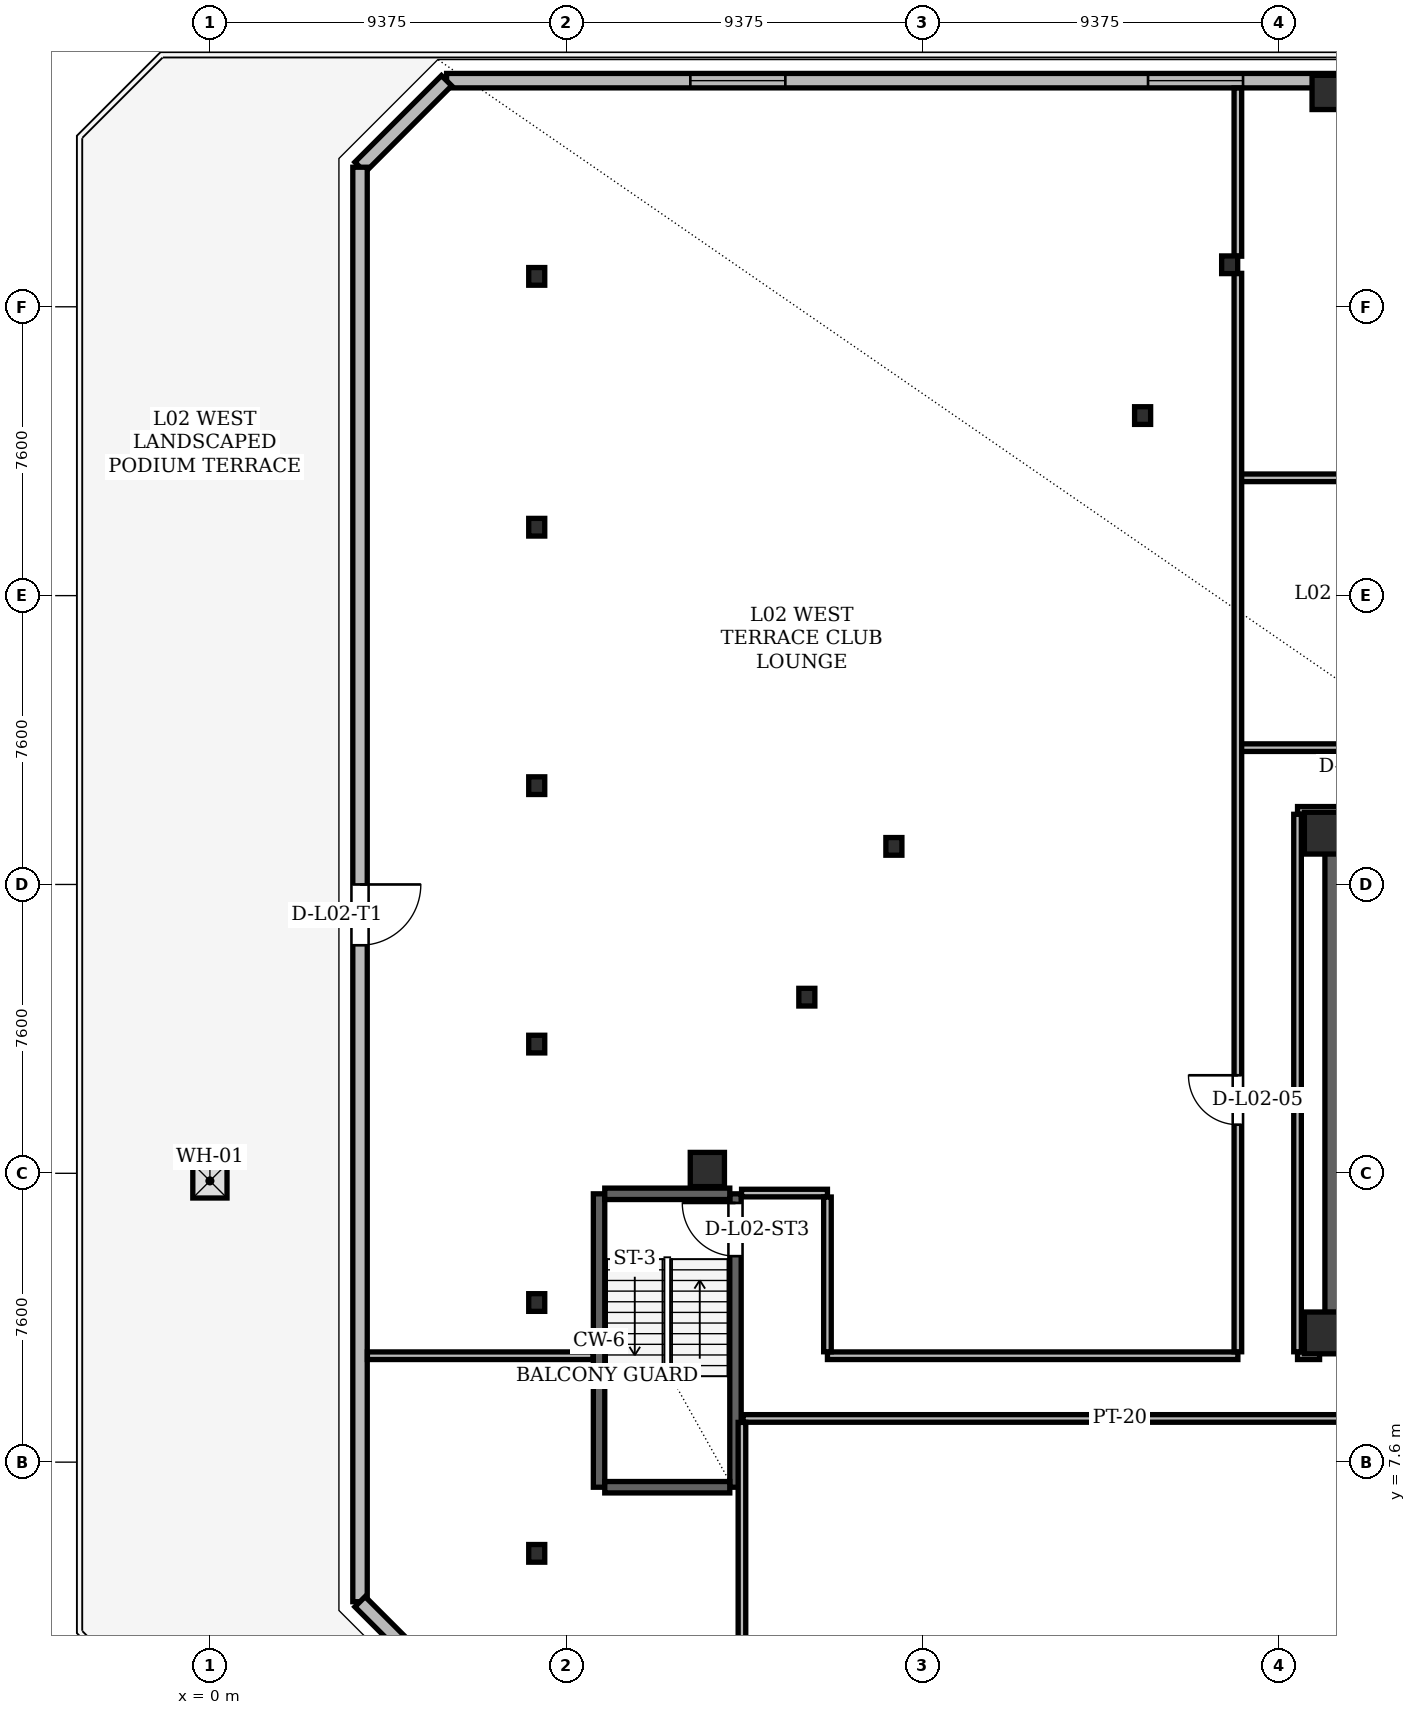
"""IFC4 building model, lengths in metres.
Left out: names, types, materials, properties, quantities, classifications, styles, units other than length and angle.
Written with IfcOpenShell. Run it as: python <this file> out.ifc"""

import sys

from ifc_helpers import new_model, si_unit, direction, frame, frame_2d, origin, origin_2d, place, context, subcontext, project, spatial, rectangle, hollow_rectangle, i_section, extrude, element, fill, save


model = new_model("IFC4")
c1 = context("Model", 3, precision=1e-05, world=origin(), true_north=direction((0.0, 1.0)))
c2 = subcontext(c1, "Body", "Model", "MODEL_VIEW")
j1 = project(units=[si_unit("LENGTHUNIT", "METRE"), si_unit("PLANEANGLEUNIT", "RADIAN")], contexts=[c1])
p1 = place(None, origin())
s1 = spatial("IfcSite", under=j1, at=p1, CompositionType="ELEMENT")
p2 = place(p1, origin())
s2 = spatial("IfcBuilding", under=s1, at=p2, CompositionType="ELEMENT")
p3 = place(p2, frame((0.0, 0.0, 9.9)))
s3 = spatial("IfcBuildingStorey", under=s2, at=p3, CompositionType="ELEMENT", Elevation=9.9)
for number, where, z_axis, x_axis in (
    (1, (29.35, 11.0, 0.0), (0.0, 0.0, 1.0), (1.0, 0.0, 0.0)),
    (2, (29.35, 24.15, 0.0), (0.0, 0.0, 1.0), (1.0, 0.0, 0.0)),
):
    element("IfcColumn", number, at=place(p3, frame(where, z_axis=z_axis, x_axis=x_axis)), inside=s3, PredefinedType="COLUMN", context=c2, shape_type="SweptSolid", body=[
        extrude(hollow_rectangle(XDim=1.1, YDim=1.1, WallThickness=0.09, at=origin_2d()), origin(), (0.0, 0.0, 1.0), 4.2),
    ])
for number, where, z_axis, x_axis in (
    (3, (13.09, 15.3, 0.005), (0.0, 0.0, 1.0), (1.0, 0.0, 0.0)),
    (4, (29.452, 43.64, 0.005), (0.0, 0.0, 1.0), (1.0, 0.0, 0.0)),
):
    element("IfcColumn", number, at=place(p3, frame(where, z_axis=z_axis, x_axis=x_axis)), inside=s3, PredefinedType="COLUMN", context=c2, shape_type="SweptSolid", body=[
        extrude(hollow_rectangle(XDim=0.9, YDim=0.9, WallThickness=0.075, at=origin_2d()), origin(), (0.0, 0.0, 1.0), 4.191),
    ])
for number, where, z_axis, x_axis in (
    (5, (26.834, 39.106, 0.005), (0.0, 0.0, 1.0), (1.0, 0.0, 0.0)),
    (6, (24.543, 35.138, 0.005), (0.0, 0.0, 1.0), (1.0, 0.0, 0.0)),
    (7, (17.998, 23.802, 0.005), (0.0, 0.0, 1.0), (1.0, 0.0, 0.0)),
    (8, (15.708, 19.834, 0.005), (0.0, 0.0, 1.0), (1.0, 0.0, 0.0)),
):
    element("IfcColumn", number, at=place(p3, frame(where, z_axis=z_axis, x_axis=x_axis)), inside=s3, PredefinedType="COLUMN", context=c2, shape_type="SweptSolid", body=[
        extrude(i_section(OverallWidth=0.422, OverallDepth=0.465, WebThickness=0.045, FlangeThickness=0.072, at=origin_2d()), origin(), (0.0, 0.0, 1.0), 4.191),
    ])
for number, where, z_axis, x_axis in (
    (9, (8.6, 5.2, 0.0), (0.0, 0.0, 1.0), (1.0, 0.0, 0.0)),
    (10, (8.6, 11.8, 0.0), (0.0, 0.0, 1.0), (1.0, 0.0, 0.0)),
    (11, (8.6, 18.6, 0.0), (0.0, 0.0, 1.0), (1.0, 0.0, 0.0)),
    (12, (8.6, 25.4, 0.0), (0.0, 0.0, 1.0), (1.0, 0.0, 0.0)),
    (13, (8.6, 32.2, 0.0), (0.0, 0.0, 1.0), (1.0, 0.0, 0.0)),
    (14, (8.6, 38.8, 0.0), (0.0, 0.0, 1.0), (1.0, 0.0, 0.0)),
):
    element("IfcColumn", number, at=place(p3, frame(where, z_axis=z_axis, x_axis=x_axis)), inside=s3, PredefinedType="COLUMN", context=c2, shape_type="SweptSolid", body=[
        extrude(i_section(OverallWidth=0.422, OverallDepth=0.465, WebThickness=0.045, FlangeThickness=0.072, at=origin_2d()), origin(), (0.0, 0.0, 1.0), 4.2),
    ])
p4 = place(p3, frame((29.64, 11.0, 0.0), z_axis=(0.0, 0.0, 1.0), x_axis=(0.0, 1.0, 0.0)))
e15 = element("IfcWall", 15, at=p4, inside=s3, PredefinedType="SHEAR", context=c2, shape_type="SweptSolid", body=[
    extrude(rectangle(XDim=13.3, YDim=0.6, at=frame_2d((6.65, 0.0))), origin(), (0.0, 0.0, 1.0), 3.92),
])
p5 = place(p3, frame((29.35, 11.24, 0.0), z_axis=(0.0, 0.0, 1.0), x_axis=(1.0, 0.0, 0.0)))
e16 = element("IfcWall", 16, at=p5, inside=s3, PredefinedType="SHEAR", context=c2, shape_type="SweptSolid", body=[
    extrude(rectangle(XDim=7.1, YDim=0.6, at=frame_2d((3.55, 0.0))), origin(), (0.0, 0.0, 1.0), 3.92),
])
p6 = place(p3, frame((10.24, 6.94, 0.0), z_axis=(0.0, 0.0, 1.0), x_axis=(0.0, 1.0, 0.0)))
e17 = element("IfcWall", 17, at=p6, inside=s3, PredefinedType="SHEAR", context=c2, shape_type="SweptSolid", body=[
    extrude(rectangle(XDim=7.72, YDim=0.3, at=frame_2d((3.86, 0.0))), origin(), (0.0, 0.0, 1.0), 3.92),
])
p7 = place(p3, frame((13.83, 6.94, 0.0), z_axis=(0.0, 0.0, 1.0), x_axis=(0.0, 1.0, 0.0)))
e18 = element("IfcWall", 18, at=p7, inside=s3, PredefinedType="SHEAR", context=c2, shape_type="SweptSolid", body=[
    extrude(rectangle(XDim=7.72, YDim=0.3, at=frame_2d((3.86, 0.0))), origin(), (0.0, 0.0, 1.0), 3.92),
])
p8 = place(p7, frame((6.08, 0.0, 0.0)))
e19 = element("IfcOpeningElement", 19, at=p8, cuts=e18, PredefinedType="OPENING", context=c2, shape_type="SweptSolid", body=[
    extrude(rectangle(XDim=1.4, YDim=2.2, at=frame_2d((0.7, 1.1))), frame((0.0, 0.15, 0.0), z_axis=(0.0, -1.0, 0.0), x_axis=(1.0, 0.0, 0.0)), (0.0, 0.0, 1.0), 0.3),
])
for number, where, z_axis, x_axis in (
    (20, (10.39, 6.94, 0.0), (0.0, 0.0, 1.0), (1.0, 0.0, 0.0)),
    (21, (10.39, 14.66, 0.0), (0.0, 0.0, 1.0), (1.0, 0.0, 0.0)),
):
    element("IfcWall", number, at=place(p3, frame(where, z_axis=z_axis, x_axis=x_axis)), inside=s3, PredefinedType="SHEAR", context=c2, shape_type="SweptSolid", body=[
        extrude(rectangle(XDim=3.29, YDim=0.3, at=frame_2d((1.645, 0.0))), origin(), (0.0, 0.0, 1.0), 3.92),
    ])
p9 = place(p3, frame((33.6, 43.95, 0.0), z_axis=(0.0, 0.0, 1.0), x_axis=(-1.0, 0.0, 0.0)))
e22 = element("IfcWall", 22, at=p9, inside=s3, PredefinedType="SOLIDWALL", context=c2, shape_type="SweptSolid", body=[
    extrude(rectangle(XDim=27.372, YDim=0.38, at=frame_2d((13.686, 0.0))), origin(), (0.0, 0.0, 1.0), 3.054),
])
p10 = place(p9, frame((6.414, 0.0, 0.85)))
e23 = element("IfcOpeningElement", 23, at=p10, cuts=e22, PredefinedType="OPENING", context=c2, shape_type="SweptSolid", body=[
    extrude(rectangle(XDim=2.5, YDim=2.034, at=frame_2d((1.25, 1.017))), frame((0.0, 0.19, 0.0), z_axis=(0.0, -1.0, 0.0), x_axis=(1.0, 0.0, 0.0)), (0.0, 0.0, 1.0), 0.38),
])
p11 = place(p9, frame((18.458, 0.0, 0.85)))
e24 = element("IfcOpeningElement", 24, at=p11, cuts=e22, PredefinedType="OPENING", context=c2, shape_type="SweptSolid", body=[
    extrude(rectangle(XDim=2.5, YDim=2.034, at=frame_2d((1.25, 1.017))), frame((0.0, 0.19, 0.0), z_axis=(0.0, -1.0, 0.0), x_axis=(1.0, 0.0, 0.0)), (0.0, 0.0, 1.0), 0.38),
])
p12 = place(p3, frame((6.228, 43.95, 0.0), z_axis=(0.0, 0.0, 1.0), x_axis=(-0.707106781187, -0.707106781187, 0.0)))
e25 = element("IfcWall", 25, at=p12, inside=s3, PredefinedType="SOLIDWALL", context=c2, shape_type="SweptSolid", body=[
    extrude(rectangle(XDim=3.221, YDim=0.38, at=frame_2d((1.611, 0.0))), origin(), (0.0, 0.0, 1.0), 3.92),
])
p13 = place(p3, frame((3.95, 41.672, 0.0), z_axis=(0.0, 0.0, 1.0), x_axis=(0.0, -1.0, 0.0)))
e26 = element("IfcWall", 26, at=p13, inside=s3, PredefinedType="SOLIDWALL", context=c2, shape_type="SweptSolid", body=[
    extrude(rectangle(XDim=37.744, YDim=0.38, at=frame_2d((18.872, 0.0))), origin(), (0.0, 0.0, 1.0), 3.92),
])
p14 = place(p13, frame((18.872, 0.0, 0.0)))
e27 = element("IfcOpeningElement", 27, at=p14, cuts=e26, PredefinedType="OPENING", context=c2, shape_type="SweptSolid", body=[
    extrude(rectangle(XDim=1.6, YDim=2.2, at=frame_2d((0.8, 1.1))), frame((0.0, 0.19, 0.0), z_axis=(0.0, -1.0, 0.0), x_axis=(1.0, 0.0, 0.0)), (0.0, 0.0, 1.0), 0.38),
])
p15 = place(p3, frame((3.95, 3.928, 0.0), z_axis=(0.0, 0.0, 1.0), x_axis=(0.707106781187, -0.707106781187, 0.0)))
e28 = element("IfcWall", 28, at=p15, inside=s3, PredefinedType="SOLIDWALL", context=c2, shape_type="SweptSolid", body=[
    extrude(rectangle(XDim=3.221, YDim=0.38, at=frame_2d((1.611, 0.0))), origin(), (0.0, 0.0, 1.0), 3.92),
])
p16 = place(p3, frame((14.03, 8.75, 0.0), z_axis=(0.0, 0.0, 1.0), x_axis=(1.0, 0.0, 0.0)))
e29 = element("IfcWall", 29, at=p16, inside=s3, PredefinedType="PARTITIONING", context=c2, shape_type="SweptSolid", body=[
    extrude(rectangle(XDim=41.57, YDim=0.2, at=frame_2d((20.785, 0.0))), origin(), (0.0, 0.0, 1.0), 2.983),
])
p17 = place(p16, frame((20.035, 0.0, 0.0)))
e30 = element("IfcOpeningElement", 30, at=p17, cuts=e29, PredefinedType="OPENING", context=c2, shape_type="SweptSolid", body=[
    extrude(rectangle(XDim=1.3, YDim=2.2, at=frame_2d((0.65, 1.1))), frame((0.0, 0.1, 0.0), z_axis=(0.0, -1.0, 0.0), x_axis=(1.0, 0.0, 0.0)), (0.0, 0.0, 1.0), 0.2),
])
p18 = place(p3, frame((4.144, 10.4, 0.0), z_axis=(0.0, 0.0, 1.0), x_axis=(1.0, 0.0, 0.0)))
e31 = element("IfcWall", 31, at=p18, inside=s3, PredefinedType="PARTITIONING", context=c2, shape_type="SweptSolid", body=[
    extrude(rectangle(XDim=5.936, YDim=0.2, at=frame_2d((2.968, 0.0))), origin(), (0.0, 0.0, 1.0), 2.53),
])
p19 = place(p3, frame((16.25, 10.4, 0.0), z_axis=(0.0, 0.0, 1.0), x_axis=(1.0, 0.0, 0.0)))
e32 = element("IfcWall", 32, at=p19, inside=s3, PredefinedType="PARTITIONING", context=c2, shape_type="SweptSolid", body=[
    extrude(rectangle(XDim=10.8, YDim=0.2, at=frame_2d((5.4, 0.0))), origin(), (0.0, 0.0, 1.0), 3.92),
])
p20 = place(p3, frame((28.62, 10.4, 0.0), z_axis=(0.0, 0.0, 1.0), x_axis=(1.0, 0.0, 0.0)))
e33 = element("IfcWall", 33, at=p20, inside=s3, PredefinedType="PARTITIONING", context=c2, shape_type="SweptSolid", body=[
    extrude(rectangle(XDim=0.58, YDim=0.2, at=frame_2d((0.29, 0.0))), origin(), (0.0, 0.0, 1.0), 2.983),
])
p21 = place(p3, frame((13.99, 14.68, 0.0), z_axis=(0.0, 0.0, 1.0), x_axis=(1.0, 0.0, 0.0)))
e34 = element("IfcWall", 34, at=p21, inside=s3, PredefinedType="PARTITIONING", context=c2, shape_type="SweptSolid", body=[
    extrude(rectangle(XDim=2.26, YDim=0.2, at=frame_2d((1.13, 0.0))), origin(), (0.0, 0.0, 1.0), 2.983),
])
p22 = place(p3, frame((28.62, 24.75, 0.0), z_axis=(0.0, 0.0, 1.0), x_axis=(1.0, 0.0, 0.0)))
e35 = element("IfcWall", 35, at=p22, inside=s3, PredefinedType="PARTITIONING", context=c2, shape_type="SweptSolid", body=[
    extrude(rectangle(XDim=17.76, YDim=0.2, at=frame_2d((8.88, 0.0))), origin(), (0.0, 0.0, 1.0), 2.983),
])
p23 = place(p3, frame((27.05, 26.4, 0.0), z_axis=(0.0, 0.0, 1.0), x_axis=(1.0, 0.0, 0.0)))
e36 = element("IfcWall", 36, at=p23, inside=s3, PredefinedType="PARTITIONING", context=c2, shape_type="SweptSolid", body=[
    extrude(rectangle(XDim=28.55, YDim=0.2, at=frame_2d((14.275, 0.0))), origin(), (0.0, 0.0, 1.0), 2.983),
])
p24 = place(p23, frame((2.885, 0.0, 0.0)))
e37 = element("IfcOpeningElement", 37, at=p24, cuts=e36, PredefinedType="OPENING", context=c2, shape_type="SweptSolid", body=[
    extrude(rectangle(XDim=0.88, YDim=2.08, at=frame_2d((0.44, 1.04))), frame((0.0, 0.1, 0.0), z_axis=(0.0, -1.0, 0.0), x_axis=(1.0, 0.0, 0.0)), (0.0, 0.0, 1.0), 0.2),
])
p25 = place(p23, frame((8.964, 0.0, 0.0)))
e38 = element("IfcOpeningElement", 38, at=p25, cuts=e36, PredefinedType="OPENING", context=c2, shape_type="SweptSolid", body=[
    extrude(rectangle(XDim=0.88, YDim=2.08, at=frame_2d((0.44, 1.04))), frame((0.0, 0.1, 0.0), z_axis=(0.0, -1.0, 0.0), x_axis=(1.0, 0.0, 0.0)), (0.0, 0.0, 1.0), 0.2),
])
p26 = place(p23, frame((14.688, 0.0, 0.0)))
e39 = element("IfcOpeningElement", 39, at=p26, cuts=e36, PredefinedType="OPENING", context=c2, shape_type="SweptSolid", body=[
    extrude(rectangle(XDim=0.88, YDim=2.08, at=frame_2d((0.44, 1.04))), frame((0.0, 0.1, 0.0), z_axis=(0.0, -1.0, 0.0), x_axis=(1.0, 0.0, 0.0)), (0.0, 0.0, 1.0), 0.2),
])
p27 = place(p3, frame((27.05, 33.5, 0.0), z_axis=(0.0, 0.0, 1.0), x_axis=(1.0, 0.0, 0.0)))
e40 = element("IfcWall", 40, at=p27, inside=s3, PredefinedType="PARTITIONING", context=c2, shape_type="SweptSolid", body=[
    extrude(rectangle(XDim=12.95, YDim=0.2, at=frame_2d((6.475, 0.0))), origin(), (0.0, 0.0, 1.0), 2.983),
])
p28 = place(p3, frame((14.0, 1.844, 0.0), z_axis=(0.0, 0.0, 1.0), x_axis=(0.0, 1.0, 0.0)))
e41 = element("IfcWall", 41, at=p28, inside=s3, PredefinedType="PARTITIONING", context=c2, shape_type="SweptSolid", body=[
    extrude(rectangle(XDim=6.802, YDim=0.2, at=frame_2d((3.401, 0.0))), origin(), (0.0, 0.0, 1.0), 3.92),
])
p29 = place(p3, frame((16.25, 10.504, 0.0), z_axis=(0.0, 0.0, 1.0), x_axis=(0.0, 1.0, 0.0)))
e42 = element("IfcWall", 42, at=p29, inside=s3, PredefinedType="PARTITIONING", context=c2, shape_type="SweptSolid", body=[
    extrude(rectangle(XDim=4.072, YDim=0.2, at=frame_2d((2.036, 0.0))), origin(), (0.0, 0.0, 1.0), 2.983),
])
p30 = place(p3, frame((27.05, 10.504, 0.0), z_axis=(0.0, 0.0, 1.0), x_axis=(0.0, 1.0, 0.0)))
e43 = element("IfcWall", 43, at=p30, inside=s3, PredefinedType="PARTITIONING", context=c2, shape_type="SweptSolid", body=[
    extrude(rectangle(XDim=28.376, YDim=0.2, at=frame_2d((14.188, 0.0))), origin(), (0.0, 0.0, 1.0), 2.983),
])
p31 = place(p30, frame((5.975, 0.0, 0.0)))
e44 = element("IfcOpeningElement", 44, at=p31, cuts=e43, PredefinedType="OPENING", context=c2, shape_type="SweptSolid", body=[
    extrude(rectangle(XDim=1.3, YDim=2.2, at=frame_2d((0.65, 1.1))), frame((0.0, 0.1, 0.0), z_axis=(0.0, -1.0, 0.0), x_axis=(1.0, 0.0, 0.0)), (0.0, 0.0, 1.0), 0.2),
])
p32 = place(p3, frame((27.05, 39.332, 0.0), z_axis=(0.0, 0.0, 1.0), x_axis=(0.0, 1.0, 0.0)))
e45 = element("IfcWall", 45, at=p32, inside=s3, PredefinedType="PARTITIONING", context=c2, shape_type="SweptSolid", body=[
    extrude(rectangle(XDim=4.425, YDim=0.2, at=frame_2d((2.212, 0.0))), origin(), (0.0, 0.0, 1.0), 3.054),
])
p33 = place(p3, frame((28.62, 10.504, 0.0), z_axis=(0.0, 0.0, 1.0), x_axis=(0.0, 1.0, 0.0)))
e46 = element("IfcWall", 46, at=p33, inside=s3, PredefinedType="PARTITIONING", context=c2, shape_type="SweptSolid", body=[
    extrude(rectangle(XDim=14.142, YDim=0.2, at=frame_2d((7.071, 0.0))), origin(), (0.0, 0.0, 1.0), 2.983),
])
p34 = place(p10, origin())
e47 = element("IfcWindow", 47, at=p34, inside=s3, PartitioningType="SINGLE_PANEL", PredefinedType="WINDOW", context=c2, shape_type="SweptSolid", body=[
    extrude(rectangle(XDim=2.5, YDim=2.034, at=frame_2d((1.25, 1.017))), frame((0.0, 0.03, 0.0), z_axis=(0.0, -1.0, 0.0), x_axis=(1.0, 0.0, 0.0)), (0.0, 0.0, 1.0), 0.06),
])
fill(e23, e47)
p35 = place(p11, origin())
e48 = element("IfcWindow", 48, at=p35, inside=s3, PartitioningType="SINGLE_PANEL", PredefinedType="WINDOW", context=c2, shape_type="SweptSolid", body=[
    extrude(rectangle(XDim=2.5, YDim=2.034, at=frame_2d((1.25, 1.017))), frame((0.0, 0.03, 0.0), z_axis=(0.0, -1.0, 0.0), x_axis=(1.0, 0.0, 0.0)), (0.0, 0.0, 1.0), 0.06),
])
fill(e24, e48)
p36 = place(p14, origin())
e49 = element("IfcDoor", 49, at=p36, inside=s3, OperationType="SINGLE_SWING_LEFT", PredefinedType="DOOR", context=c2, shape_type="SweptSolid", body=[
    extrude(rectangle(XDim=1.6, YDim=2.2, at=frame_2d((0.8, 1.1))), frame((0.0, 0.025, 0.0), z_axis=(0.0, -1.0, 0.0), x_axis=(1.0, 0.0, 0.0)), (0.0, 0.0, 1.0), 0.05),
])
fill(e27, e49)
p37 = place(p3, frame((0.0, 0.0, -0.28)))
p38 = place(p37, frame((0.0, 15.0, 0.0)))
p39 = place(p38, frame((0.0, 0.0, 0.23)))
e50 = element("IfcWindow", 50, at=p39, inside=s3, PartitioningType="SINGLE_PANEL", PredefinedType="SKYLIGHT", context=c2, shape_type="SweptSolid", body=[
    extrude(rectangle(XDim=0.9, YDim=0.9, at=origin_2d()), origin(), (0.0, 0.0, 1.0), 0.05),
])
p40 = place(p8, origin())
e51 = element("IfcDoor", 51, at=p40, inside=s3, OperationType="SINGLE_SWING_RIGHT", PredefinedType="DOOR", context=c2, shape_type="SweptSolid", body=[
    extrude(rectangle(XDim=1.4, YDim=2.2, at=frame_2d((0.7, 1.1))), frame((0.0, 0.025, 0.0), z_axis=(0.0, -1.0, 0.0), x_axis=(1.0, 0.0, 0.0)), (0.0, 0.0, 1.0), 0.05),
])
fill(e19, e51)
p41 = place(p31, origin())
e52 = element("IfcDoor", 52, at=p41, inside=s3, OperationType="SINGLE_SWING_RIGHT", PredefinedType="DOOR", context=c2, shape_type="SweptSolid", body=[
    extrude(rectangle(XDim=1.3, YDim=2.2, at=frame_2d((0.65, 1.1))), frame((0.0, 0.025, 0.0), z_axis=(0.0, -1.0, 0.0), x_axis=(1.0, 0.0, 0.0)), (0.0, 0.0, 1.0), 0.05),
])
fill(e44, e52)
save(model, sys.argv[1])
